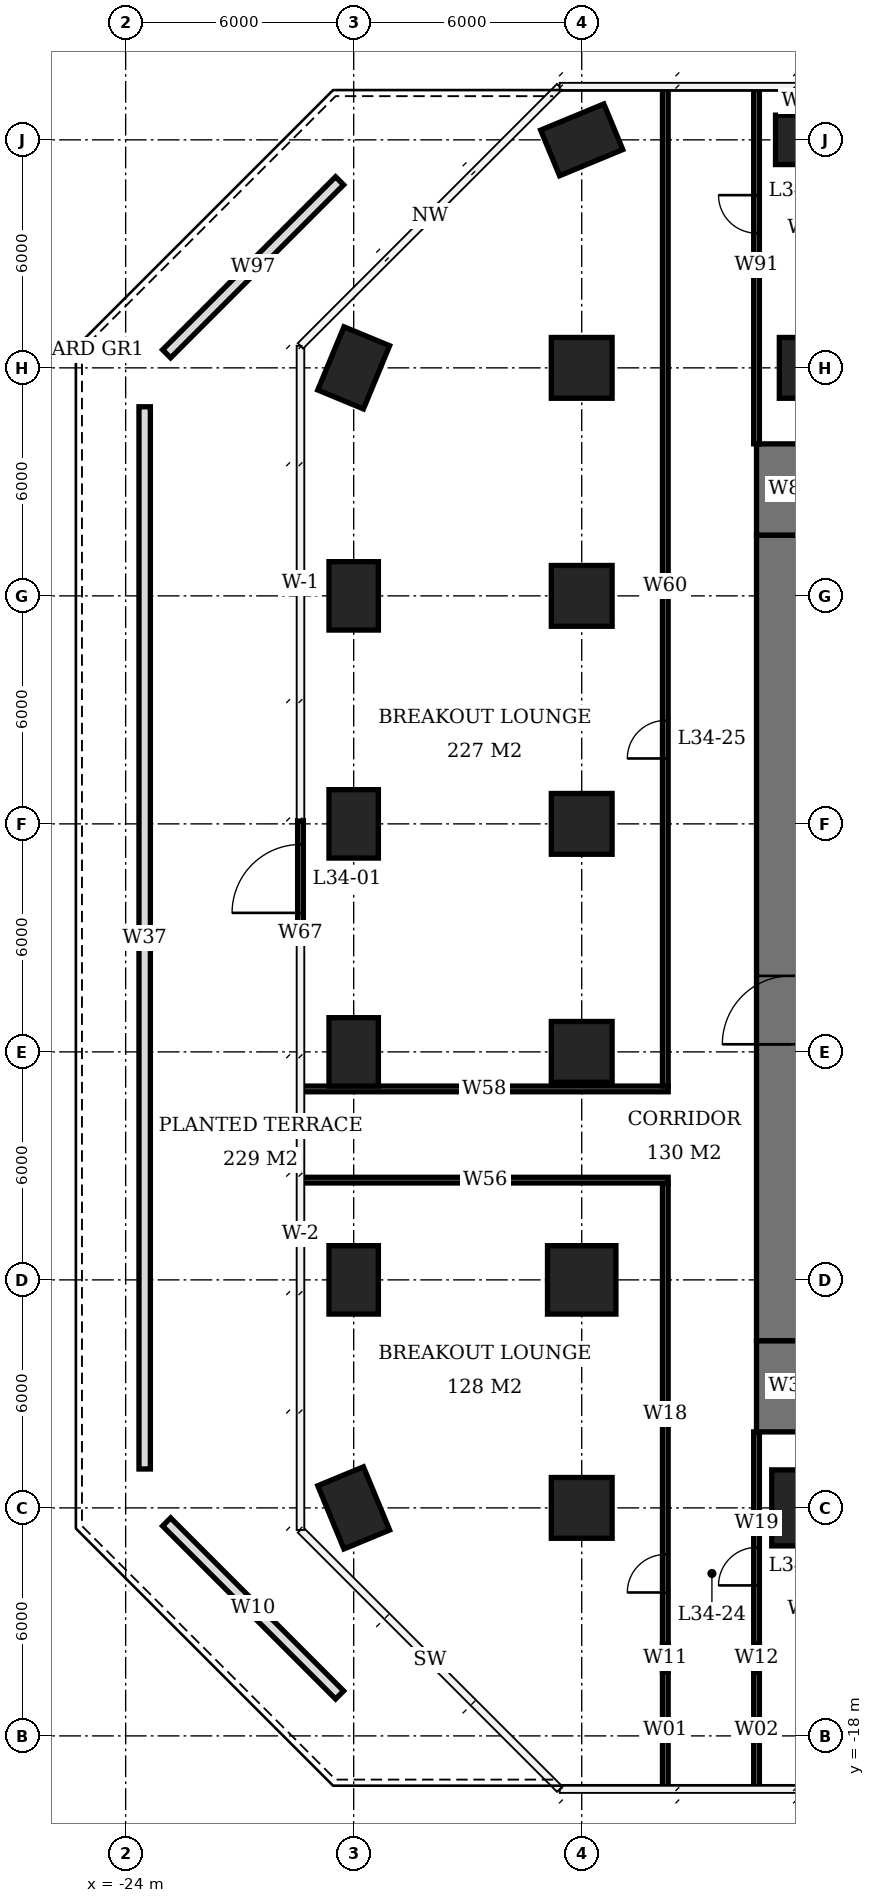
"""IFC4 building model, lengths in metres.
Left out: names, types, materials, properties, quantities, classifications, styles, units other than length and angle.
Written with IfcOpenShell. Run it as: python <this file> out.ifc"""

import sys

from ifc_helpers import new_model, si_unit, direction, frame, frame_2d, origin, origin_2d, place, context, subcontext, project, spatial, rectangle, extrude, element, fill, save


model = new_model("IFC4")
c1 = context("Model", 3, precision=1e-05, world=origin(), true_north=direction((0.0, 1.0)))
c2 = subcontext(c1, "Body", "Model", "MODEL_VIEW")
j1 = project(units=[si_unit("LENGTHUNIT", "METRE"), si_unit("PLANEANGLEUNIT", "RADIAN")], contexts=[c1])
p1 = place(None, origin())
s1 = spatial("IfcSite", under=j1, at=p1, CompositionType="ELEMENT")
p2 = place(p1, origin())
s2 = spatial("IfcBuilding", under=s1, at=p2, CompositionType="ELEMENT")
p3 = place(p2, frame((0.0, 0.0, 140.6)))
s3 = spatial("IfcBuildingStorey", under=s2, at=p3, CompositionType="ELEMENT", Elevation=140.6)
for number, where, z_axis, x_axis in (
    (1, (-18.0, -12.0, 0.0), (0.0, 0.0, 1.0), (-0.383, 0.924, 0.0)),
    (2, (-18.0, -6.0, 0.0), (0.0, 0.0, 1.0), (0.0, 1.0, 0.0)),
    (3, (-18.0, 0.0, 0.0), (0.0, 0.0, 1.0), (0.0, 1.0, 0.0)),
    (4, (-18.0, 6.0, 0.0), (0.0, 0.0, 1.0), (0.0, 1.0, 0.0)),
    (5, (-18.0, 12.0, 0.0), (0.0, 0.0, 1.0), (0.0, 1.0, 0.0)),
    (6, (-18.0, 18.0, 0.0), (0.0, 0.0, 1.0), (0.383, 0.924, 0.0)),
):
    element("IfcColumn", number, at=place(p3, frame(where, z_axis=z_axis, x_axis=x_axis)), inside=s3, PredefinedType="COLUMN", context=c2, shape_type="SweptSolid", body=[
        extrude(rectangle(XDim=1.8, YDim=1.3, at=origin_2d()), origin(), (0.0, 0.0, 1.0), 3.9),
    ])
p4 = place(p3, frame((-12.0, -12.0, 0.0), z_axis=(0.0, 0.0, 1.0), x_axis=(1.0, 0.0, 0.0)))
e7 = element("IfcColumn", 7, at=p4, inside=s3, PredefinedType="COLUMN", context=c2, shape_type="SweptSolid", body=[
    extrude(rectangle(XDim=1.6, YDim=1.6, at=origin_2d()), origin(), (0.0, 0.0, 1.0), 3.9),
])
p5 = place(p3, frame((-12.0, -6.0, 0.0), z_axis=(0.0, 0.0, 1.0), x_axis=(1.0, 0.0, 0.0)))
e8 = element("IfcColumn", 8, at=p5, inside=s3, PredefinedType="COLUMN", context=c2, shape_type="SweptSolid", body=[
    extrude(rectangle(XDim=1.8, YDim=1.8, at=origin_2d()), origin(), (0.0, 0.0, 1.0), 3.9),
])
for number, where, z_axis, x_axis in (
    (9, (-12.0, 0.0, 0.0), (0.0, 0.0, 1.0), (1.0, 0.0, 0.0)),
    (10, (-12.0, 6.0, 0.0), (0.0, 0.0, 1.0), (1.0, 0.0, 0.0)),
    (11, (-12.0, 12.0, 0.0), (0.0, 0.0, 1.0), (1.0, 0.0, 0.0)),
    (12, (-12.0, 18.0, 0.0), (0.0, 0.0, 1.0), (1.0, 0.0, 0.0)),
):
    element("IfcColumn", number, at=place(p3, frame(where, z_axis=z_axis, x_axis=x_axis)), inside=s3, PredefinedType="COLUMN", context=c2, shape_type="SweptSolid", body=[
        extrude(rectangle(XDim=1.6, YDim=1.6, at=origin_2d()), origin(), (0.0, 0.0, 1.0), 3.9),
    ])
p6 = place(p3, frame((-12.0, 24.0, 0.0), z_axis=(0.0, 0.0, 1.0), x_axis=(0.923879532511, 0.382683432365, 0.0)))
e13 = element("IfcColumn", 13, at=p6, inside=s3, PredefinedType="COLUMN", context=c2, shape_type="SweptSolid", body=[
    extrude(rectangle(XDim=1.8, YDim=1.3, at=origin_2d()), origin(), (0.0, 0.0, 1.0), 3.9),
])
p7 = place(p3, frame((-6.0, -12.0, 0.0), z_axis=(0.0, 0.0, 1.0), x_axis=(1.0, 0.0, 0.0)))
e14 = element("IfcColumn", 14, at=p7, inside=s3, PredefinedType="COLUMN", context=c2, shape_type="SweptSolid", body=[
    extrude(rectangle(XDim=2.0, YDim=2.0, at=origin_2d()), origin(), (0.0, 0.0, 1.0), 3.9),
])
p8 = place(p3, frame((-6.0, 18.0, 0.0), z_axis=(0.0, 0.0, 1.0), x_axis=(1.0, 0.0, 0.0)))
e15 = element("IfcColumn", 15, at=p8, inside=s3, PredefinedType="COLUMN", context=c2, shape_type="SweptSolid", body=[
    extrude(rectangle(XDim=1.6, YDim=1.6, at=origin_2d()), origin(), (0.0, 0.0, 1.0), 3.9),
])
p9 = place(p3, frame((-6.0, 24.0, 0.0), z_axis=(0.0, 0.0, 1.0), x_axis=(1.0, 0.0, 0.0)))
e16 = element("IfcColumn", 16, at=p9, inside=s3, PredefinedType="COLUMN", context=c2, shape_type="SweptSolid", body=[
    extrude(rectangle(XDim=1.8, YDim=1.3, at=origin_2d()), origin(), (0.0, 0.0, 1.0), 3.9),
])
p10 = place(p3, frame((-6.5, -7.6, 0.0), z_axis=(0.0, 0.0, 1.0), x_axis=(0.0, 1.0, 0.0)))
e17 = element("IfcWall", 17, at=p10, inside=s3, PredefinedType="SHEAR", context=c2, shape_type="SweptSolid", body=[
    extrude(rectangle(XDim=21.2, YDim=1.8, at=frame_2d((10.6, 0.0))), origin(), (0.0, 0.0, 1.0), 3.9),
])
p11 = place(p10, frame((7.8, 0.0, 0.0)))
e18 = element("IfcOpeningElement", 18, at=p11, cuts=e17, PredefinedType="OPENING", context=c2, shape_type="SweptSolid", body=[
    extrude(rectangle(XDim=1.8, YDim=2.4, at=frame_2d((0.9, 1.2))), frame((0.0, 0.91, 0.0), z_axis=(0.0, -1.0, 0.0), x_axis=(1.0, 0.0, 0.0)), (0.0, 0.0, 1.0), 1.82),
])
for number, where, z_axis, x_axis in (
    (19, (-6.5, -10.0, 0.0), (0.0, 0.0, 1.0), (0.0, 1.0, 0.0)),
    (20, (-6.5, 13.6, 0.0), (0.0, 0.0, 1.0), (0.0, 1.0, 0.0)),
):
    element("IfcWall", number, at=place(p3, frame(where, z_axis=z_axis, x_axis=x_axis)), inside=s3, PredefinedType="SHEAR", context=c2, shape_type="SweptSolid", body=[
        extrude(rectangle(XDim=2.4, YDim=1.8, at=frame_2d((1.2, 0.0))), origin(), (0.0, 0.0, 1.0), 3.9),
    ])
p12 = place(p3, frame((-19.4, 2.958, 0.0), z_axis=(0.0, 0.0, 1.0), x_axis=(0.0, 1.0, 0.0)))
e21 = element("IfcWall", 21, at=p12, inside=s3, PredefinedType="USERDEFINED", context=c2, shape_type="SweptSolid", body=[
    extrude(rectangle(XDim=3.126, YDim=0.15, at=frame_2d((1.563, 0.0))), origin(), (0.0, 0.0, 1.0), 3.9),
])
p13 = place(p12, frame((0.7, 0.0, 0.0)))
e22 = element("IfcOpeningElement", 22, at=p13, cuts=e21, PredefinedType="OPENING", context=c2, shape_type="SweptSolid", body=[
    extrude(rectangle(XDim=1.8, YDim=2.4, at=frame_2d((0.9, 1.2))), frame((0.0, 0.085, 0.0), z_axis=(0.0, -1.0, 0.0), x_axis=(1.0, 0.0, 0.0)), (0.0, 0.0, 1.0), 0.17),
])
p14 = place(p3, frame((-18.37, -16.923, 0.0), z_axis=(0.0, 0.0, 1.0), x_axis=(-0.707106781187, 0.707106781187, 0.0)))
e23 = element("IfcWall", 23, at=p14, inside=s3, PredefinedType="USERDEFINED", context=c2, shape_type="SweptSolid", body=[
    extrude(rectangle(XDim=6.438, YDim=0.3, at=frame_2d((3.219, 0.0))), origin(), (0.0, 0.0, 1.0), 0.6),
])
p15 = place(p3, frame((-23.5, -10.976, 0.0), z_axis=(0.0, 0.0, 1.0), x_axis=(0.0, 1.0, 0.0)))
e24 = element("IfcWall", 24, at=p15, inside=s3, PredefinedType="USERDEFINED", context=c2, shape_type="SweptSolid", body=[
    extrude(rectangle(XDim=27.953, YDim=0.3, at=frame_2d((13.976, 0.0))), origin(), (0.0, 0.0, 1.0), 0.6),
])
p16 = place(p3, frame((-22.923, 18.37, 0.0), z_axis=(0.0, 0.0, 1.0), x_axis=(0.707106781187, 0.707106781187, 0.0)))
e25 = element("IfcWall", 25, at=p16, inside=s3, PredefinedType="USERDEFINED", context=c2, shape_type="SweptSolid", body=[
    extrude(rectangle(XDim=6.438, YDim=0.3, at=frame_2d((3.219, 0.0))), origin(), (0.0, 0.0, 1.0), 0.6),
])
p17 = place(p3, frame((-19.35, -3.375, 0.0), z_axis=(0.0, 0.0, 1.0), x_axis=(1.0, 0.0, 0.0)))
e26 = element("IfcWall", 26, at=p17, inside=s3, PredefinedType="PARTITIONING", context=c2, shape_type="SweptSolid", body=[
    extrude(rectangle(XDim=9.625, YDim=0.15, at=frame_2d((4.812, 0.0))), origin(), (0.0, 0.0, 1.0), 3.65),
])
p18 = place(p3, frame((-19.4, -0.975, 0.0), z_axis=(0.0, 0.0, 1.0), x_axis=(1.0, 0.0, 0.0)))
e27 = element("IfcWall", 27, at=p18, inside=s3, PredefinedType="PARTITIONING", context=c2, shape_type="SweptSolid", body=[
    extrude(rectangle(XDim=9.675, YDim=0.15, at=frame_2d((4.837, 0.0))), origin(), (0.0, 0.0, 1.0), 3.65),
])
p19 = place(p3, frame((-9.8, -19.4, 0.0), z_axis=(0.0, 0.0, 1.0), x_axis=(0.0, 1.0, 0.0)))
e28 = element("IfcWall", 28, at=p19, inside=s3, PredefinedType="PARTITIONING", context=c2, shape_type="SweptSolid", body=[
    extrude(rectangle(XDim=3.09, YDim=0.15, at=frame_2d((1.545, 0.0))), origin(), (0.0, 0.0, 1.0), 3.65),
])
p20 = place(p3, frame((-9.8, -16.31, 0.0), z_axis=(0.0, 0.0, 1.0), x_axis=(0.0, 1.0, 0.0)))
e29 = element("IfcWall", 29, at=p20, inside=s3, PredefinedType="PARTITIONING", context=c2, shape_type="SweptSolid", body=[
    extrude(rectangle(XDim=0.72, YDim=0.15, at=frame_2d((0.36, 0.0))), origin(), (0.0, 0.0, 1.0), 2.65),
])
p21 = place(p3, frame((-9.8, -15.59, 0.0), z_axis=(0.0, 0.0, 1.0), x_axis=(0.0, 1.0, 0.0)))
e30 = element("IfcWall", 30, at=p21, inside=s3, PredefinedType="PARTITIONING", context=c2, shape_type="SweptSolid", body=[
    extrude(rectangle(XDim=12.14, YDim=0.15, at=frame_2d((6.07, 0.0))), origin(), (0.0, 0.0, 1.0), 3.65),
])
p22 = place(p21, frame((1.364, 0.0, 0.0)))
e31 = element("IfcOpeningElement", 31, at=p22, cuts=e30, PredefinedType="OPENING", context=c2, shape_type="SweptSolid", body=[
    extrude(rectangle(XDim=1.0, YDim=2.1, at=frame_2d((0.5, 1.05))), frame((0.0, 0.085, 0.0), z_axis=(0.0, -1.0, 0.0), x_axis=(1.0, 0.0, 0.0)), (0.0, 0.0, 1.0), 0.17),
])
p23 = place(p3, frame((-9.8, -0.9, 0.0), z_axis=(0.0, 0.0, 1.0), x_axis=(0.0, 1.0, 0.0)))
e32 = element("IfcWall", 32, at=p23, inside=s3, PredefinedType="PARTITIONING", context=c2, shape_type="SweptSolid", body=[
    extrude(rectangle(XDim=26.3, YDim=0.15, at=frame_2d((13.15, 0.0))), origin(), (0.0, 0.0, 1.0), 3.65),
])
p24 = place(p23, frame((8.621, 0.0, 0.0)))
e33 = element("IfcOpeningElement", 33, at=p24, cuts=e32, PredefinedType="OPENING", context=c2, shape_type="SweptSolid", body=[
    extrude(rectangle(XDim=1.0, YDim=2.1, at=frame_2d((0.5, 1.05))), frame((0.0, 0.085, 0.0), z_axis=(0.0, -1.0, 0.0), x_axis=(1.0, 0.0, 0.0)), (0.0, 0.0, 1.0), 0.17),
])
p25 = place(p3, frame((-7.4, -19.4, 0.0), z_axis=(0.0, 0.0, 1.0), x_axis=(0.0, 1.0, 0.0)))
e34 = element("IfcWall", 34, at=p25, inside=s3, PredefinedType="PARTITIONING", context=c2, shape_type="SweptSolid", body=[
    extrude(rectangle(XDim=3.09, YDim=0.15, at=frame_2d((1.545, 0.0))), origin(), (0.0, 0.0, 1.0), 3.65),
])
p26 = place(p3, frame((-7.4, -16.31, 0.0), z_axis=(0.0, 0.0, 1.0), x_axis=(0.0, 1.0, 0.0)))
e35 = element("IfcWall", 35, at=p26, inside=s3, PredefinedType="PARTITIONING", context=c2, shape_type="SweptSolid", body=[
    extrude(rectangle(XDim=0.72, YDim=0.15, at=frame_2d((0.36, 0.0))), origin(), (0.0, 0.0, 1.0), 2.65),
])
p27 = place(p3, frame((-7.4, -15.59, 0.0), z_axis=(0.0, 0.0, 1.0), x_axis=(0.0, 1.0, 0.0)))
e36 = element("IfcWall", 36, at=p27, inside=s3, PredefinedType="PARTITIONING", context=c2, shape_type="SweptSolid", body=[
    extrude(rectangle(XDim=5.59, YDim=0.15, at=frame_2d((2.795, 0.0))), origin(), (0.0, 0.0, 1.0), 3.65),
])
p28 = place(p27, frame((1.55, 0.0, 0.0)))
e37 = element("IfcOpeningElement", 37, at=p28, cuts=e36, PredefinedType="OPENING", context=c2, shape_type="SweptSolid", body=[
    extrude(rectangle(XDim=1.0, YDim=2.1, at=frame_2d((0.5, 1.05))), frame((0.0, 0.085, 0.0), z_axis=(0.0, -1.0, 0.0), x_axis=(1.0, 0.0, 0.0)), (0.0, 0.0, 1.0), 0.17),
])
p29 = place(p3, frame((-7.4, 16.0, 0.0), z_axis=(0.0, 0.0, 1.0), x_axis=(0.0, 1.0, 0.0)))
e38 = element("IfcWall", 38, at=p29, inside=s3, PredefinedType="PARTITIONING", context=c2, shape_type="SweptSolid", body=[
    extrude(rectangle(XDim=9.4, YDim=0.15, at=frame_2d((4.7, 0.0))), origin(), (0.0, 0.0, 1.0), 3.65),
])
p30 = place(p29, frame((5.545, 0.0, 0.0)))
e39 = element("IfcOpeningElement", 39, at=p30, cuts=e38, PredefinedType="OPENING", context=c2, shape_type="SweptSolid", body=[
    extrude(rectangle(XDim=1.0, YDim=2.1, at=frame_2d((0.5, 1.05))), frame((0.0, 0.085, 0.0), z_axis=(0.0, -1.0, 0.0), x_axis=(1.0, 0.0, 0.0)), (0.0, 0.0, 1.0), 0.17),
])
p31 = place(p13, origin())
e40 = element("IfcDoor", 40, at=p31, inside=s3, OperationType="DOUBLE_DOOR_SINGLE_SWING", PredefinedType="DOOR", context=c2, shape_type="SweptSolid", body=[
    extrude(rectangle(XDim=1.8, YDim=2.4, at=frame_2d((0.9, 1.2))), frame((0.0, 0.025, 0.0), z_axis=(0.0, -1.0, 0.0), x_axis=(1.0, 0.0, 0.0)), (0.0, 0.0, 1.0), 0.05),
])
fill(e22, e40)
p32 = place(p11, origin())
e41 = element("IfcDoor", 41, at=p32, inside=s3, OperationType="DOUBLE_DOOR_SINGLE_SWING", PredefinedType="DOOR", context=c2, shape_type="SweptSolid", body=[
    extrude(rectangle(XDim=1.8, YDim=2.4, at=frame_2d((0.9, 1.2))), frame((0.0, 0.025, 0.0), z_axis=(0.0, -1.0, 0.0), x_axis=(1.0, 0.0, 0.0)), (0.0, 0.0, 1.0), 0.05),
])
fill(e18, e41)
p33 = place(p28, origin())
e42 = element("IfcDoor", 42, at=p33, inside=s3, OperationType="SINGLE_SWING_LEFT", PredefinedType="DOOR", context=c2, shape_type="SweptSolid", body=[
    extrude(rectangle(XDim=1.0, YDim=2.1, at=frame_2d((0.5, 1.05))), frame((0.0, 0.025, 0.0), z_axis=(0.0, -1.0, 0.0), x_axis=(1.0, 0.0, 0.0)), (0.0, 0.0, 1.0), 0.05),
])
fill(e37, e42)
p34 = place(p22, origin())
e43 = element("IfcDoor", 43, at=p34, inside=s3, OperationType="SINGLE_SWING_LEFT", PredefinedType="DOOR", context=c2, shape_type="SweptSolid", body=[
    extrude(rectangle(XDim=1.0, YDim=2.1, at=frame_2d((0.5, 1.05))), frame((0.0, 0.025, 0.0), z_axis=(0.0, -1.0, 0.0), x_axis=(1.0, 0.0, 0.0)), (0.0, 0.0, 1.0), 0.05),
])
fill(e31, e43)
p35 = place(p24, origin())
e44 = element("IfcDoor", 44, at=p35, inside=s3, OperationType="SINGLE_SWING_LEFT", PredefinedType="DOOR", context=c2, shape_type="SweptSolid", body=[
    extrude(rectangle(XDim=1.0, YDim=2.1, at=frame_2d((0.5, 1.05))), frame((0.0, 0.025, 0.0), z_axis=(0.0, -1.0, 0.0), x_axis=(1.0, 0.0, 0.0)), (0.0, 0.0, 1.0), 0.05),
])
fill(e33, e44)
p36 = place(p30, origin())
e45 = element("IfcDoor", 45, at=p36, inside=s3, OperationType="SINGLE_SWING_RIGHT", PredefinedType="DOOR", context=c2, shape_type="SweptSolid", body=[
    extrude(rectangle(XDim=1.0, YDim=2.1, at=frame_2d((0.5, 1.05))), frame((0.0, 0.025, 0.0), z_axis=(0.0, -1.0, 0.0), x_axis=(1.0, 0.0, 0.0)), (0.0, 0.0, 1.0), 0.05),
])
fill(e39, e45)
save(model, sys.argv[1])
